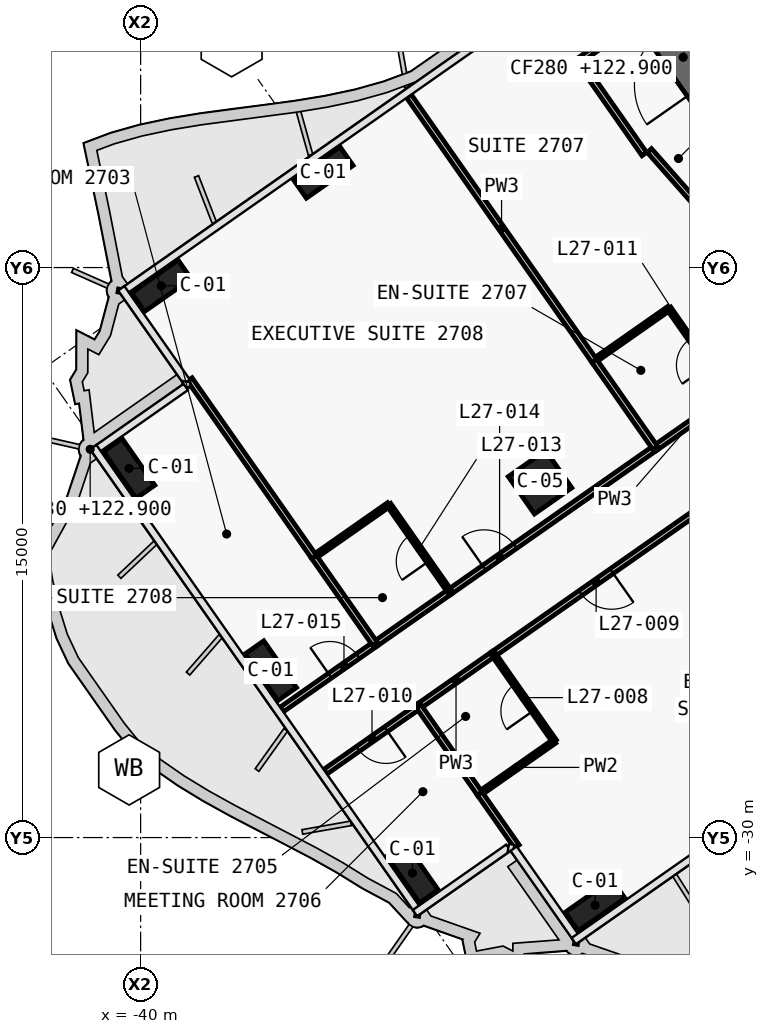
"""IFC4 building model, lengths in metres.
Left out: names, types, materials, properties, quantities, classifications, styles, units other than length and angle.
Written with IfcOpenShell. Run it as: python <this file> out.ifc"""

import sys

from ifc_helpers import new_model, si_unit, direction, frame, frame_2d, origin, origin_2d, place, context, subcontext, project, spatial, polyline, rectangle, outline, extrude, element, fill, save


model = new_model("IFC4")
c1 = context("Model", 3, precision=1e-05, world=origin(), true_north=direction((0.0, 1.0)))
c2 = subcontext(c1, "Body", "Model", "MODEL_VIEW")
j1 = project(units=[si_unit("LENGTHUNIT", "METRE"), si_unit("PLANEANGLEUNIT", "RADIAN")], contexts=[c1])
p1 = place(None, origin())
s1 = spatial("IfcSite", under=j1, at=p1, CompositionType="ELEMENT")
p2 = place(p1, origin())
s2 = spatial("IfcBuilding", under=s1, at=p2, CompositionType="ELEMENT")
p3 = place(p2, frame((0.0, 0.0, 122.9)))
s3 = spatial("IfcBuildingStorey", under=s2, at=p3, CompositionType="ELEMENT", Elevation=122.9)
p4 = place(p3, frame((-21.708, -15.2, 0.0), z_axis=(0.0, 0.0, 1.0), x_axis=(-0.573576324356, 0.819152122709, 0.0)))
e1 = element("IfcWall", 1, at=p4, inside=s3, PredefinedType="SHEAR", context=c2, shape_type="SweptSolid", body=[
    extrude(outline(polyline([(0.0, 0.5), (0.0, -0.5), (9.2, -0.5), (9.2, 0.5), (0.0, 0.5)])), origin(), (0.0, 0.0, 1.0), 3.6),
])
p5 = place(p4, frame((6.1, 0.0, 0.0)))
e2 = element("IfcOpeningElement", 2, at=p5, cuts=e1, PredefinedType="OPENING", context=c2, shape_type="SweptSolid", body=[
    extrude(rectangle(XDim=1.8, YDim=2.1, at=frame_2d((0.9, 1.05))), frame((0.0, 0.51, 0.0), z_axis=(0.0, -1.0, 0.0), x_axis=(1.0, 0.0, 0.0)), (0.0, 0.0, 1.0), 1.02),
])
p6 = place(p4, frame((1.9, 0.0, 0.0)))
e3 = element("IfcOpeningElement", 3, at=p6, cuts=e1, PredefinedType="OPENING", context=c2, shape_type="SweptSolid", body=[
    extrude(rectangle(XDim=1.8, YDim=2.1, at=frame_2d((0.9, 1.05))), frame((0.0, 0.51, 0.0), z_axis=(0.0, -1.0, 0.0), x_axis=(1.0, 0.0, 0.0)), (0.0, 0.0, 1.0), 1.02),
])
for number, where, z_axis, x_axis in (
    (4, (-28.042, -31.782, 0.0), (0.0, 0.0, 1.0), (-0.819, -0.574, 0.0)),
    (5, (-35.197, -12.498, 0.0), (0.0, 0.0, 1.0), (-0.819, -0.574, 0.0)),
    (6, (-39.456, -15.481, 0.0), (0.0, 0.0, 1.0), (-0.819, -0.574, 0.0)),
    (7, (-32.847, -30.935, 0.0), (0.0, 0.0, 1.0), (-0.574, 0.819, 0.0)),
    (8, (-36.575, -25.61, 0.0), (0.0, 0.0, 1.0), (-0.574, 0.819, 0.0)),
    (9, (-40.303, -20.286, 0.0), (0.0, 0.0, 1.0), (-0.574, 0.819, 0.0)),
):
    element("IfcColumn", number, at=place(p3, frame(where, z_axis=z_axis, x_axis=x_axis)), inside=s3, PredefinedType="COLUMN", context=c2, shape_type="SweptSolid", body=[
        extrude(rectangle(XDim=1.5, YDim=0.6, at=origin_2d()), origin(), (0.0, 0.0, 1.0), 3.6),
    ])
p7 = place(p3, frame((-29.49, -20.649, 0.0), z_axis=(0.0, 0.0, 1.0), x_axis=(-0.819152044289, -0.573576436351, 0.0)))
e10 = element("IfcColumn", 10, at=p7, inside=s3, PredefinedType="COLUMN", context=c2, shape_type="SweptSolid", body=[
    extrude(rectangle(XDim=1.2, YDim=1.2, at=origin_2d()), origin(), (0.0, 0.0, 1.0), 3.6),
])
p8 = place(p3, frame((-26.46, -19.748, 0.0), z_axis=(0.0, 0.0, 1.0), x_axis=(0.819179439794, 0.573537309527, 0.0)))
e11 = element("IfcWall", 11, at=p8, inside=s3, PredefinedType="PARTITIONING", context=c2, shape_type="SweptSolid", body=[
    extrude(rectangle(XDim=2.404, YDim=0.15, at=frame_2d((1.202, 0.0))), origin(), (0.0, 0.0, 1.0), 3.32),
])
p9 = place(p3, frame((-31.866, -23.533, 0.0), z_axis=(0.0, 0.0, 1.0), x_axis=(0.819153746897, 0.573574004767, 0.0)))
e12 = element("IfcWall", 12, at=p9, inside=s3, PredefinedType="PARTITIONING", context=c2, shape_type="SweptSolid", body=[
    extrude(rectangle(XDim=6.603, YDim=0.15, at=frame_2d((3.302, 0.0))), origin(), (0.0, 0.0, 1.0), 2.6),
])
p10 = place(p9, frame((1.101, 0.0, 0.0)))
e13 = element("IfcOpeningElement", 13, at=p10, cuts=e12, PredefinedType="OPENING", context=c2, shape_type="SweptSolid", body=[
    extrude(rectangle(XDim=1.0, YDim=2.1, at=frame_2d((0.5, 1.05))), frame((0.0, 0.085, 0.0), z_axis=(0.0, -1.0, 0.0), x_axis=(1.0, 0.0, 0.0)), (0.0, 0.0, 1.0), 0.17),
])
p11 = place(p3, frame((-33.833, -24.91, 0.0), z_axis=(0.0, 0.0, 1.0), x_axis=(0.819146032251, 0.573585022335, 0.0)))
e14 = element("IfcWall", 14, at=p11, inside=s3, PredefinedType="PARTITIONING", context=c2, shape_type="SweptSolid", body=[
    extrude(rectangle(XDim=2.404, YDim=0.15, at=frame_2d((1.202, 0.0))), origin(), (0.0, 0.0, 1.0), 3.32),
])
p12 = place(p3, frame((-36.288, -26.63, 0.0), z_axis=(0.0, 0.0, 1.0), x_axis=(0.81915932427, 0.57356603932, 0.0)))
e15 = element("IfcWall", 15, at=p12, inside=s3, PredefinedType="PARTITIONING", context=c2, shape_type="SweptSolid", body=[
    extrude(rectangle(XDim=3.002, YDim=0.15, at=frame_2d((1.501, 0.0))), origin(), (0.0, 0.0, 1.0), 2.5),
])
p13 = place(p12, frame((1.551, 0.0, 0.0)))
e16 = element("IfcOpeningElement", 16, at=p13, cuts=e15, PredefinedType="OPENING", context=c2, shape_type="SweptSolid", body=[
    extrude(rectangle(XDim=0.9, YDim=2.1, at=frame_2d((0.45, 1.05))), frame((0.0, 0.085, 0.0), z_axis=(0.0, -1.0, 0.0), x_axis=(1.0, 0.0, 0.0)), (0.0, 0.0, 1.0), 0.17),
])
p14 = place(p3, frame((-25.31, -21.384, 0.0), z_axis=(0.0, 0.0, 1.0), x_axis=(-0.819153746897, -0.573574004767, 0.0)))
e17 = element("IfcWall", 17, at=p14, inside=s3, PredefinedType="PARTITIONING", context=c2, shape_type="SweptSolid", body=[
    extrude(rectangle(XDim=6.603, YDim=0.15, at=frame_2d((3.302, 0.0))), origin(), (0.0, 0.0, 1.0), 2.6),
])
p15 = place(p14, frame((2.802, 0.0, 0.0)))
e18 = element("IfcOpeningElement", 18, at=p15, cuts=e17, PredefinedType="OPENING", context=c2, shape_type="SweptSolid", body=[
    extrude(rectangle(XDim=1.0, YDim=2.1, at=frame_2d((0.5, 1.05))), frame((0.0, 0.085, 0.0), z_axis=(0.0, -1.0, 0.0), x_axis=(1.0, 0.0, 0.0)), (0.0, 0.0, 1.0), 0.17),
])
p16 = place(p3, frame((-30.716, -25.17, 0.0), z_axis=(0.0, 0.0, 1.0), x_axis=(-0.819146032251, -0.573585022335, 0.0)))
e19 = element("IfcWall", 19, at=p16, inside=s3, PredefinedType="PARTITIONING", context=c2, shape_type="SweptSolid", body=[
    extrude(rectangle(XDim=2.404, YDim=0.15, at=frame_2d((1.202, 0.0))), origin(), (0.0, 0.0, 1.0), 3.32),
])
p17 = place(p3, frame((-32.682, -26.546, 0.0), z_axis=(0.0, 0.0, 1.0), x_axis=(-0.81915932427, -0.57356603932, 0.0)))
e20 = element("IfcWall", 20, at=p17, inside=s3, PredefinedType="PARTITIONING", context=c2, shape_type="SweptSolid", body=[
    extrude(rectangle(XDim=3.002, YDim=0.15, at=frame_2d((1.501, 0.0))), origin(), (0.0, 0.0, 1.0), 2.5),
])
p18 = place(p17, frame((1.051, 0.0, 0.0)))
e21 = element("IfcOpeningElement", 21, at=p18, cuts=e20, PredefinedType="OPENING", context=c2, shape_type="SweptSolid", body=[
    extrude(rectangle(XDim=0.9, YDim=2.1, at=frame_2d((0.45, 1.05))), frame((0.0, 0.085, 0.0), z_axis=(0.0, -1.0, 0.0), x_axis=(1.0, 0.0, 0.0)), (0.0, 0.0, 1.0), 0.17),
])
p19 = place(p3, frame((-26.746, -12.014, 0.0), z_axis=(0.0, 0.0, 1.0), x_axis=(-0.573560650686, 0.819163097304, 0.0)))
e22 = element("IfcWall", 22, at=p19, inside=s3, PredefinedType="PARTITIONING", context=c2, shape_type="SweptSolid", body=[
    extrude(rectangle(XDim=3.0, YDim=0.15, at=frame_2d((1.5, 0.0))), origin(), (0.0, 0.0, 1.0), 3.32),
])
p20 = place(p3, frame((-28.467, -9.556, 0.0), z_axis=(0.0, 0.0, 1.0), x_axis=(0.819109000826, 0.573637903879, 0.0)))
e23 = element("IfcWall", 23, at=p20, inside=s3, PredefinedType="PARTITIONING", context=c2, shape_type="SweptSolid", body=[
    extrude(rectangle(XDim=1.68, YDim=0.15, at=frame_2d((0.84, 0.0))), origin(), (0.0, 0.0, 1.0), 3.32),
])
p21 = place(p3, frame((-22.284, -16.827, 0.0), z_axis=(0.0, 0.0, 1.0), x_axis=(-0.661545117561, 0.749905365651, 0.0)))
e24 = element("IfcWall", 24, at=p21, inside=s3, PredefinedType="PARTITIONING", context=c2, shape_type="SweptSolid", body=[
    extrude(rectangle(XDim=6.543, YDim=0.15, at=frame_2d((3.271, 0.0))), origin(), (0.0, 0.0, 1.0), 2.6),
])
p22 = place(p3, frame((-26.099, -16.076, 0.0), z_axis=(0.0, 0.0, 1.0), x_axis=(-0.819155442668, -0.573571582932, 0.0)))
e25 = element("IfcWall", 25, at=p22, inside=s3, PredefinedType="PARTITIONING", context=c2, shape_type="SweptSolid", body=[
    extrude(rectangle(XDim=2.4, YDim=0.12, at=frame_2d((1.2, 0.0))), origin(), (0.0, 0.0, 1.0), 3.32),
])
p23 = place(p3, frame((-24.492, -18.37, 0.0), z_axis=(0.0, 0.0, 1.0), x_axis=(-0.573550118428, 0.819170471667, 0.0)))
e26 = element("IfcWall", 26, at=p23, inside=s3, PredefinedType="PARTITIONING", context=c2, shape_type="SweptSolid", body=[
    extrude(rectangle(XDim=2.8, YDim=0.12, at=frame_2d((1.4, 0.0))), origin(), (0.0, 0.0, 1.0), 2.6),
])
p24 = place(p23, frame((0.975, 0.0, 0.0)))
e27 = element("IfcOpeningElement", 27, at=p24, cuts=e26, PredefinedType="OPENING", context=c2, shape_type="SweptSolid", body=[
    extrude(rectangle(XDim=0.85, YDim=2.05, at=frame_2d((0.425, 1.025))), frame((0.0, 0.07, 0.0), z_axis=(0.0, -1.0, 0.0), x_axis=(1.0, 0.0, 0.0)), (0.0, 0.0, 1.0), 0.14),
])
p25 = place(p3, frame((-28.065, -17.453, 0.0), z_axis=(0.0, 0.0, 1.0), x_axis=(-0.573593433868, 0.819140142237, 0.0)))
e28 = element("IfcWall", 28, at=p25, inside=s3, PredefinedType="PARTITIONING", context=c2, shape_type="SweptSolid", body=[
    extrude(rectangle(XDim=8.499, YDim=0.15, at=frame_2d((4.25, 0.0))), origin(), (0.0, 0.0, 1.0), 2.6),
])
p26 = place(p3, frame((-26.458, -19.747, 0.0), z_axis=(0.0, 0.0, 1.0), x_axis=(-0.573550118428, 0.819170471667, 0.0)))
e29 = element("IfcWall", 29, at=p26, inside=s3, PredefinedType="PARTITIONING", context=c2, shape_type="SweptSolid", body=[
    extrude(rectangle(XDim=2.8, YDim=0.15, at=frame_2d((1.4, 0.0))), origin(), (0.0, 0.0, 1.0), 2.6),
])
p27 = place(p3, frame((-31.864, -23.532, 0.0), z_axis=(0.0, 0.0, 1.0), x_axis=(-0.573550118428, 0.819170471667, 0.0)))
e30 = element("IfcWall", 30, at=p27, inside=s3, PredefinedType="PARTITIONING", context=c2, shape_type="SweptSolid", body=[
    extrude(rectangle(XDim=2.8, YDim=0.12, at=frame_2d((1.4, 0.0))), origin(), (0.0, 0.0, 1.0), 2.6),
])
p28 = place(p27, frame((0.975, 0.0, 0.0)))
e31 = element("IfcOpeningElement", 31, at=p28, cuts=e30, PredefinedType="OPENING", context=c2, shape_type="SweptSolid", body=[
    extrude(rectangle(XDim=0.85, YDim=2.05, at=frame_2d((0.425, 1.025))), frame((0.0, 0.07, 0.0), z_axis=(0.0, -1.0, 0.0), x_axis=(1.0, 0.0, 0.0)), (0.0, 0.0, 1.0), 0.14),
])
p29 = place(p3, frame((-33.471, -21.238, 0.0), z_axis=(0.0, 0.0, 1.0), x_axis=(-0.819141114317, -0.573592045652, 0.0)))
e32 = element("IfcWall", 32, at=p29, inside=s3, PredefinedType="PARTITIONING", context=c2, shape_type="SweptSolid", body=[
    extrude(rectangle(XDim=2.4, YDim=0.12, at=frame_2d((1.2, 0.0))), origin(), (0.0, 0.0, 1.0), 3.32),
])
p30 = place(p3, frame((-35.438, -22.615, 0.0), z_axis=(0.0, 0.0, 1.0), x_axis=(-0.573568678046, 0.819157476658, 0.0)))
e33 = element("IfcWall", 33, at=p30, inside=s3, PredefinedType="PARTITIONING", context=c2, shape_type="SweptSolid", body=[
    extrude(rectangle(XDim=5.701, YDim=0.15, at=frame_2d((2.851, 0.0))), origin(), (0.0, 0.0, 1.0), 3.32),
])
p31 = place(p3, frame((-33.831, -24.909, 0.0), z_axis=(0.0, 0.0, 1.0), x_axis=(-0.573550118428, 0.819170471667, 0.0)))
e34 = element("IfcWall", 34, at=p31, inside=s3, PredefinedType="PARTITIONING", context=c2, shape_type="SweptSolid", body=[
    extrude(rectangle(XDim=2.8, YDim=0.15, at=frame_2d((1.4, 0.0))), origin(), (0.0, 0.0, 1.0), 2.6),
])
p32 = place(p3, frame((-31.077, -28.842, 0.0), z_axis=(0.0, 0.0, 1.0), x_axis=(0.819188907105, 0.573523787192, 0.0)))
e35 = element("IfcWall", 35, at=p32, inside=s3, PredefinedType="PARTITIONING", context=c2, shape_type="SweptSolid", body=[
    extrude(rectangle(XDim=2.4, YDim=0.12, at=frame_2d((1.2, 0.0))), origin(), (0.0, 0.0, 1.0), 3.32),
])
p33 = place(p3, frame((-29.111, -27.464, 0.0), z_axis=(0.0, 0.0, 1.0), x_axis=(-0.573550118428, 0.819170471667, 0.0)))
e36 = element("IfcWall", 36, at=p33, inside=s3, PredefinedType="PARTITIONING", context=c2, shape_type="SweptSolid", body=[
    extrude(rectangle(XDim=2.8, YDim=0.12, at=frame_2d((1.4, 0.0))), origin(), (0.0, 0.0, 1.0), 3.32),
])
p34 = place(p33, frame((0.975, 0.0, 0.0)))
e37 = element("IfcOpeningElement", 37, at=p34, cuts=e36, PredefinedType="OPENING", context=c2, shape_type="SweptSolid", body=[
    extrude(rectangle(XDim=0.85, YDim=2.05, at=frame_2d((0.425, 1.025))), frame((0.0, 0.07, 0.0), z_axis=(0.0, -1.0, 0.0), x_axis=(1.0, 0.0, 0.0)), (0.0, 0.0, 1.0), 0.14),
])
p35 = place(p3, frame((-30.101, -30.236, 0.0), z_axis=(0.0, 0.0, 1.0), x_axis=(-0.573597175316, 0.819137522318, 0.0)))
e38 = element("IfcWall", 38, at=p35, inside=s3, PredefinedType="PARTITIONING", context=c2, shape_type="SweptSolid", body=[
    extrude(rectangle(XDim=1.701, YDim=0.15, at=frame_2d((0.851, 0.0))), origin(), (0.0, 0.0, 1.0), 3.32),
])
p36 = place(p3, frame((-31.078, -28.841, 0.0), z_axis=(0.0, 0.0, 1.0), x_axis=(-0.573550118428, 0.819170471667, 0.0)))
e39 = element("IfcWall", 39, at=p36, inside=s3, PredefinedType="PARTITIONING", context=c2, shape_type="SweptSolid", body=[
    extrude(rectangle(XDim=2.8, YDim=0.15, at=frame_2d((1.4, 0.0))), origin(), (0.0, 0.0, 1.0), 3.32),
])
p37 = place(p5, origin())
e40 = element("IfcDoor", 40, at=p37, inside=s3, OperationType="DOUBLE_DOOR_SINGLE_SWING", PredefinedType="DOOR", context=c2, shape_type="SweptSolid", body=[
    extrude(rectangle(XDim=1.8, YDim=2.1, at=frame_2d((0.9, 1.05))), frame((0.0, 0.025, 0.0), z_axis=(0.0, -1.0, 0.0), x_axis=(1.0, 0.0, 0.0)), (0.0, 0.0, 1.0), 0.05),
])
fill(e2, e40)
p38 = place(p34, origin())
e41 = element("IfcDoor", 41, at=p38, inside=s3, OperationType="SINGLE_SWING_RIGHT", PredefinedType="DOOR", context=c2, shape_type="SweptSolid", body=[
    extrude(rectangle(XDim=0.85, YDim=2.05, at=frame_2d((0.425, 1.025))), frame((0.0, 0.025, 0.0), z_axis=(0.0, -1.0, 0.0), x_axis=(1.0, 0.0, 0.0)), (0.0, 0.0, 1.0), 0.05),
])
fill(e37, e41)
p39 = place(p15, origin())
e42 = element("IfcDoor", 42, at=p39, inside=s3, OperationType="SINGLE_SWING_RIGHT", PredefinedType="DOOR", context=c2, shape_type="SweptSolid", body=[
    extrude(rectangle(XDim=1.0, YDim=2.1, at=frame_2d((0.5, 1.05))), frame((0.0, 0.025, 0.0), z_axis=(0.0, -1.0, 0.0), x_axis=(1.0, 0.0, 0.0)), (0.0, 0.0, 1.0), 0.05),
])
fill(e18, e42)
p40 = place(p18, origin())
e43 = element("IfcDoor", 43, at=p40, inside=s3, OperationType="SINGLE_SWING_LEFT", PredefinedType="DOOR", context=c2, shape_type="SweptSolid", body=[
    extrude(rectangle(XDim=0.9, YDim=2.1, at=frame_2d((0.45, 1.05))), frame((0.0, 0.025, 0.0), z_axis=(0.0, -1.0, 0.0), x_axis=(1.0, 0.0, 0.0)), (0.0, 0.0, 1.0), 0.05),
])
fill(e21, e43)
p41 = place(p28, origin())
e44 = element("IfcDoor", 44, at=p41, inside=s3, OperationType="SINGLE_SWING_LEFT", PredefinedType="DOOR", context=c2, shape_type="SweptSolid", body=[
    extrude(rectangle(XDim=0.85, YDim=2.05, at=frame_2d((0.425, 1.025))), frame((0.0, 0.025, 0.0), z_axis=(0.0, -1.0, 0.0), x_axis=(1.0, 0.0, 0.0)), (0.0, 0.0, 1.0), 0.05),
])
fill(e31, e44)
p42 = place(p10, origin())
e45 = element("IfcDoor", 45, at=p42, inside=s3, OperationType="SINGLE_SWING_RIGHT", PredefinedType="DOOR", context=c2, shape_type="SweptSolid", body=[
    extrude(rectangle(XDim=1.0, YDim=2.1, at=frame_2d((0.5, 1.05))), frame((0.0, 0.025, 0.0), z_axis=(0.0, -1.0, 0.0), x_axis=(1.0, 0.0, 0.0)), (0.0, 0.0, 1.0), 0.05),
])
fill(e13, e45)
p43 = place(p13, origin())
e46 = element("IfcDoor", 46, at=p43, inside=s3, OperationType="SINGLE_SWING_LEFT", PredefinedType="DOOR", context=c2, shape_type="SweptSolid", body=[
    extrude(rectangle(XDim=0.9, YDim=2.1, at=frame_2d((0.45, 1.05))), frame((0.0, 0.025, 0.0), z_axis=(0.0, -1.0, 0.0), x_axis=(1.0, 0.0, 0.0)), (0.0, 0.0, 1.0), 0.05),
])
fill(e16, e46)
save(model, sys.argv[1])
